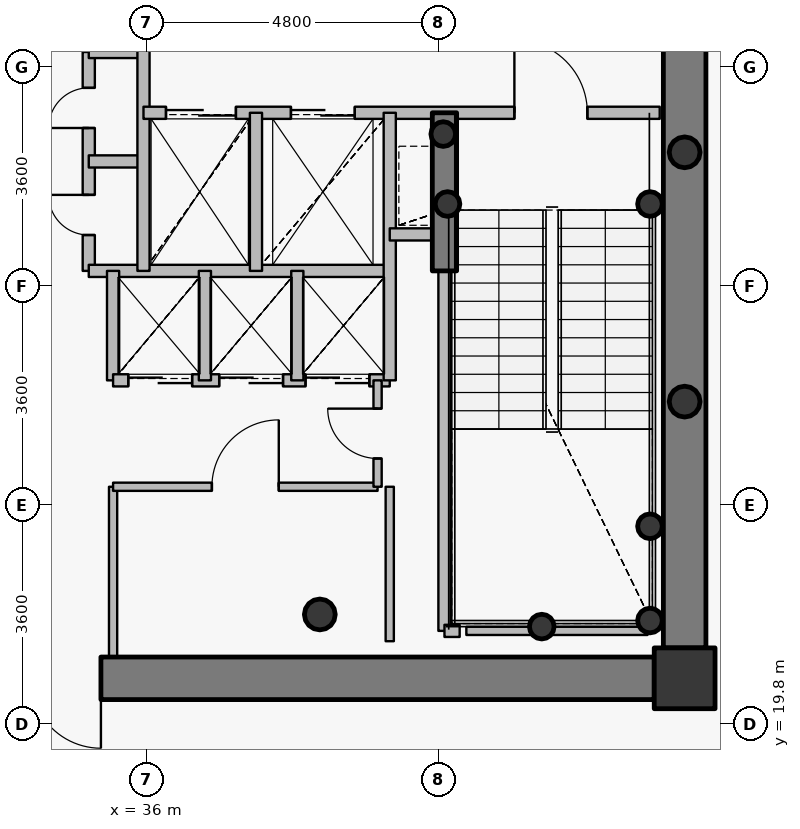
"""IFC4 building model, lengths in metres.
Left out: names, types, materials, properties, quantities, classifications, styles, units other than length and angle.
Written with IfcOpenShell. Run it as: python <this file> out.ifc"""

import sys

from ifc_helpers import new_model, si_unit, direction, frame, frame_2d, origin, origin_2d, place, context, subcontext, project, spatial, rectangle, hollow_circle, extrude, source, transform, mapped, element, fill, save


model = new_model("IFC4")
c1 = context("Model", 3, precision=1e-05, world=origin(), true_north=direction((0.0, 1.0)))
c2 = subcontext(c1, "Body", "Model", "MODEL_VIEW")
j1 = project(units=[si_unit("LENGTHUNIT", "METRE"), si_unit("PLANEANGLEUNIT", "RADIAN")], contexts=[c1])
p1 = place(None, origin())
s1 = spatial("IfcSite", under=j1, at=p1, CompositionType="ELEMENT")
p2 = place(p1, origin())
s2 = spatial("IfcBuilding", under=s1, at=p2, CompositionType="ELEMENT")
p3 = place(p2, frame((0.0, 0.0, 276.75)))
s3 = spatial("IfcBuildingStorey", under=s2, at=p3, CompositionType="ELEMENT", Elevation=276.75)
p4 = place(p3, frame((44.85, 20.55, 0.0), z_axis=(0.0, 0.0, 1.0), x_axis=(1.0, 0.0, 0.0)))
e1 = element("IfcColumn", 1, at=p4, inside=s3, PredefinedType="COLUMN", context=c2, shape_type="SweptSolid", body=[
    extrude(rectangle(XDim=1.0, YDim=1.0, at=origin_2d()), origin(), (0.0, 0.0, 1.0), 3.75),
])
p5 = place(p3, frame((38.85, 21.6, 0.0), z_axis=(0.0, 0.0, 1.0), x_axis=(1.0, 0.0, 0.0)))
e2 = element("IfcColumn", 2, at=p5, inside=s3, PredefinedType="COLUMN", context=c2, shape_type="SweptSolid", body=[
    extrude(hollow_circle(Radius=0.254, WallThickness=0.02, at=origin_2d()), origin(), (0.0, 0.0, 1.0), 3.75),
])
for number, where, z_axis, x_axis in (
    (3, (44.28, 21.5, 0.0), (0.0, 0.0, 1.0), (1.0, 0.0, 0.0)),
    (4, (44.28, 23.05, 0.0), (0.0, 0.0, 1.0), (1.0, 0.0, 0.0)),
    (5, (42.5, 21.4, 0.0), (0.0, 0.0, 1.0), (1.0, 0.0, 0.0)),
    (6, (40.95, 28.35, 0.0), (0.0, 0.0, 1.0), (1.0, 0.0, 0.0)),
    (7, (44.28, 28.35, 0.0), (0.0, 0.0, 1.0), (1.0, 0.0, 0.0)),
    (8, (40.88, 29.5, 0.0), (0.0, 0.0, 1.0), (1.0, 0.0, 0.0)),
):
    element("IfcColumn", number, at=place(p3, frame(where, z_axis=z_axis, x_axis=x_axis)), inside=s3, PredefinedType="COLUMN", context=c2, shape_type="SweptSolid", body=[
        extrude(hollow_circle(Radius=0.203, WallThickness=0.016, at=origin_2d()), origin(), (0.0, 0.0, 1.0), 3.75),
    ])
p6 = place(p3, frame((44.85, 32.95, 0.0), z_axis=(0.0, 0.0, 1.0), x_axis=(0.0, -1.0, 0.0)))
e9 = element("IfcWall", 9, at=p6, inside=s3, PredefinedType="SHEAR", context=c2, shape_type="SweptSolid", body=[
    extrude(rectangle(XDim=11.9, YDim=0.7, at=frame_2d((5.95, 0.0))), origin(), (0.0, 0.0, 1.0), 3.05),
])
p7 = place(p3, frame((44.35, 20.55, 0.0), z_axis=(0.0, 0.0, 1.0), x_axis=(-1.0, 0.0, 0.0)))
e10 = element("IfcWall", 10, at=p7, inside=s3, PredefinedType="SHEAR", context=c2, shape_type="SweptSolid", body=[
    extrude(rectangle(XDim=16.7, YDim=0.7, at=frame_2d((8.35, 0.0))), origin(), (0.0, 0.0, 1.0), 3.05),
])
p8 = place(p7, frame((12.925, 0.0, 0.0)))
e11 = element("IfcOpeningElement", 11, at=p8, cuts=e10, PredefinedType="OPENING", context=c2, shape_type="SweptSolid", body=[
    extrude(rectangle(XDim=1.15, YDim=2.15, at=origin_2d()), frame((0.575, 0.36, 1.075), z_axis=(0.0, -1.0, 0.0), x_axis=(1.0, 0.0, 0.0)), (0.0, 0.0, 1.0), 0.72),
])
p9 = place(p7, frame((9.1, 0.0, 0.0)))
e12 = element("IfcOpeningElement", 12, at=p9, cuts=e10, PredefinedType="OPENING", context=c2, shape_type="SweptSolid", body=[
    extrude(rectangle(XDim=1.15, YDim=2.15, at=origin_2d()), frame((0.575, 0.36, 1.075), z_axis=(0.0, -1.0, 0.0), x_axis=(1.0, 0.0, 0.0)), (0.0, 0.0, 1.0), 0.72),
])
p10 = place(p3, frame((40.9, 27.25, 0.0), z_axis=(0.0, 0.0, 1.0), x_axis=(0.0, 1.0, 0.0)))
e13 = element("IfcWall", 13, at=p10, inside=s3, PredefinedType="SHEAR", context=c2, shape_type="SweptSolid", body=[
    extrude(rectangle(XDim=2.6, YDim=0.4, at=frame_2d((1.3, 0.0))), origin(), (0.0, 0.0, 1.0), 3.1),
])
for number, where, z_axis, x_axis in (
    (14, (44.85, 25.1, 0.0), (0.0, 0.0, 1.0), (1.0, 0.0, 0.0)),
    (15, (44.85, 29.2, 0.0), (0.0, 0.0, 1.0), (1.0, 0.0, 0.0)),
):
    element("IfcColumn", number, at=place(p3, frame(where, z_axis=z_axis, x_axis=x_axis)), inside=s3, PredefinedType="COLUMN", context=c2, shape_type="SweptSolid", body=[
        extrude(hollow_circle(Radius=0.254, WallThickness=0.02, at=origin_2d()), origin(), (0.0, 0.0, 1.0), 3.75),
    ])
p11 = place(p3, frame((35.05, 27.25, 0.0), z_axis=(0.0, 0.0, 1.0), x_axis=(0.0, 1.0, 0.0)))
e16 = element("IfcWall", 16, at=p11, inside=s3, PredefinedType="PARTITIONING", context=c2, shape_type="SweptSolid", body=[
    extrude(rectangle(XDim=3.6, YDim=0.2, at=frame_2d((1.8, 0.0))), origin(), (0.0, 0.0, 1.0), 3.5),
])
p12 = place(p11, frame((0.59, 0.0, 0.0)))
e17 = element("IfcOpeningElement", 17, at=p12, cuts=e16, PredefinedType="OPENING", context=c2, shape_type="SweptSolid", body=[
    extrude(rectangle(XDim=0.66, YDim=2.05, at=origin_2d()), frame((0.33, 0.11, 1.025), z_axis=(0.0, -1.0, 0.0), x_axis=(1.0, 0.0, 0.0)), (0.0, 0.0, 1.0), 0.22),
])
p13 = place(p11, frame((2.35, 0.0, 0.0)))
e18 = element("IfcOpeningElement", 18, at=p13, cuts=e16, PredefinedType="OPENING", context=c2, shape_type="SweptSolid", body=[
    extrude(rectangle(XDim=0.66, YDim=2.05, at=origin_2d()), frame((0.33, 0.11, 1.025), z_axis=(0.0, -1.0, 0.0), x_axis=(1.0, 0.0, 0.0)), (0.0, 0.0, 1.0), 0.22),
])
p14 = place(p3, frame((35.05, 27.25, 0.0), z_axis=(0.0, 0.0, 1.0), x_axis=(1.0, 0.0, 0.0)))
e19 = element("IfcWall", 19, at=p14, inside=s3, PredefinedType="PARTITIONING", context=c2, shape_type="SweptSolid", body=[
    extrude(rectangle(XDim=4.95, YDim=0.2, at=frame_2d((2.475, 0.0))), origin(), (0.0, 0.0, 1.0), 3.085),
])
for number, where, z_axis, x_axis in (
    (20, (35.05, 29.05, 0.0), (0.0, 0.0, 1.0), (1.0, 0.0, 0.0)),
    (21, (35.05, 30.85, 0.0), (0.0, 0.0, 1.0), (1.0, 0.0, 0.0)),
):
    element("IfcWall", number, at=place(p3, frame(where, z_axis=z_axis, x_axis=x_axis)), inside=s3, PredefinedType="PARTITIONING", context=c2, shape_type="SweptSolid", body=[
        extrude(rectangle(XDim=0.9, YDim=0.2, at=frame_2d((0.45, 0.0))), origin(), (0.0, 0.0, 1.0), 3.5),
    ])
p15 = place(p3, frame((35.45, 20.9, 0.0), z_axis=(0.0, 0.0, 1.0), x_axis=(0.0, 1.0, 0.0)))
e22 = element("IfcWall", 22, at=p15, inside=s3, PredefinedType="PARTITIONING", context=c2, shape_type="SweptSolid", body=[
    extrude(rectangle(XDim=2.8, YDim=0.135, at=frame_2d((1.4, 0.0))), origin(), (0.0, 0.0, 1.0), 3.085),
])
p16 = place(p3, frame((35.45, 23.7, 0.0), z_axis=(0.0, 0.0, 1.0), x_axis=(1.0, 0.0, 0.0)))
e23 = element("IfcWall", 23, at=p16, inside=s3, PredefinedType="PARTITIONING", context=c2, shape_type="SweptSolid", body=[
    extrude(rectangle(XDim=4.35, YDim=0.135, at=frame_2d((2.175, 0.0))), origin(), (0.0, 0.0, 1.0), 3.085),
])
p17 = place(p16, frame((1.625, 0.0, 0.0)))
e24 = element("IfcOpeningElement", 24, at=p17, cuts=e23, PredefinedType="OPENING", context=c2, shape_type="SweptSolid", body=[
    extrude(rectangle(XDim=1.1, YDim=2.15, at=origin_2d()), frame((0.55, 0.078, 1.075), z_axis=(0.0, -1.0, 0.0), x_axis=(1.0, 0.0, 0.0)), (0.0, 0.0, 1.0), 0.155),
])
p18 = place(p3, frame((35.45, 25.45, 0.0), z_axis=(0.0, 0.0, 1.0), x_axis=(0.0, 1.0, 0.0)))
e25 = element("IfcWall", 25, at=p18, inside=s3, PredefinedType="PARTITIONING", context=c2, shape_type="SweptSolid", body=[
    extrude(rectangle(XDim=1.8, YDim=0.2, at=frame_2d((0.9, 0.0))), origin(), (0.0, 0.0, 1.0), 3.5),
])
p19 = place(p3, frame((35.45, 25.45, 0.0), z_axis=(0.0, 0.0, 1.0), x_axis=(1.0, 0.0, 0.0)))
e26 = element("IfcWall", 26, at=p19, inside=s3, PredefinedType="PARTITIONING", context=c2, shape_type="SweptSolid", body=[
    extrude(rectangle(XDim=4.55, YDim=0.2, at=frame_2d((2.275, 0.0))), origin(), (0.0, 0.0, 1.0), 3.085),
])
p20 = place(p19, frame((0.25, 0.0, 0.0)))
e27 = element("IfcOpeningElement", 27, at=p20, cuts=e26, PredefinedType="OPENING", context=c2, shape_type="SweptSolid", body=[
    extrude(rectangle(XDim=1.05, YDim=2.15, at=origin_2d()), frame((0.525, 0.11, 1.075), z_axis=(0.0, -1.0, 0.0), x_axis=(1.0, 0.0, 0.0)), (0.0, 0.0, 1.0), 0.22),
])
p21 = place(p19, frame((1.745, 0.0, 0.0)))
e28 = element("IfcOpeningElement", 28, at=p21, cuts=e26, PredefinedType="OPENING", context=c2, shape_type="SweptSolid", body=[
    extrude(rectangle(XDim=1.05, YDim=2.15, at=origin_2d()), frame((0.525, 0.11, 1.075), z_axis=(0.0, -1.0, 0.0), x_axis=(1.0, 0.0, 0.0)), (0.0, 0.0, 1.0), 0.22),
])
p22 = place(p19, frame((3.165, 0.0, 0.0)))
e29 = element("IfcOpeningElement", 29, at=p22, cuts=e26, PredefinedType="OPENING", context=c2, shape_type="SweptSolid", body=[
    extrude(rectangle(XDim=1.05, YDim=2.15, at=origin_2d()), frame((0.525, 0.11, 1.075), z_axis=(0.0, -1.0, 0.0), x_axis=(1.0, 0.0, 0.0)), (0.0, 0.0, 1.0), 0.22),
])
p23 = place(p3, frame((35.95, 27.25, 0.0), z_axis=(0.0, 0.0, 1.0), x_axis=(0.0, 1.0, 0.0)))
e30 = element("IfcWall", 30, at=p23, inside=s3, PredefinedType="PARTITIONING", context=c2, shape_type="SweptSolid", body=[
    extrude(rectangle(XDim=3.8, YDim=0.2, at=frame_2d((1.9, 0.0))), origin(), (0.0, 0.0, 1.0), 3.5),
])
p24 = place(p3, frame((35.95, 29.85, 0.0), z_axis=(0.0, 0.0, 1.0), x_axis=(1.0, 0.0, 0.0)))
e31 = element("IfcWall", 31, at=p24, inside=s3, PredefinedType="PARTITIONING", context=c2, shape_type="SweptSolid", body=[
    extrude(rectangle(XDim=8.49, YDim=0.2, at=frame_2d((4.245, 0.0))), origin(), (0.0, 0.0, 1.0), 3.085),
])
p25 = place(p24, frame((6.1, 0.0, 0.0)))
e32 = element("IfcOpeningElement", 32, at=p25, cuts=e31, PredefinedType="OPENING", context=c2, shape_type="SweptSolid", body=[
    extrude(rectangle(XDim=1.2, YDim=2.15, at=origin_2d()), frame((0.6, 0.11, 1.075), z_axis=(0.0, -1.0, 0.0), x_axis=(1.0, 0.0, 0.0)), (0.0, 0.0, 1.0), 0.22),
])
p26 = place(p24, frame((0.37, 0.0, 0.0)))
e33 = element("IfcOpeningElement", 33, at=p26, cuts=e31, PredefinedType="OPENING", context=c2, shape_type="SweptSolid", body=[
    extrude(rectangle(XDim=1.15, YDim=2.15, at=origin_2d()), frame((0.575, 0.11, 1.075), z_axis=(0.0, -1.0, 0.0), x_axis=(1.0, 0.0, 0.0)), (0.0, 0.0, 1.0), 0.22),
])
p27 = place(p24, frame((2.425, 0.0, 0.0)))
e34 = element("IfcOpeningElement", 34, at=p27, cuts=e31, PredefinedType="OPENING", context=c2, shape_type="SweptSolid", body=[
    extrude(rectangle(XDim=1.05, YDim=2.15, at=origin_2d()), frame((0.525, 0.11, 1.075), z_axis=(0.0, -1.0, 0.0), x_axis=(1.0, 0.0, 0.0)), (0.0, 0.0, 1.0), 0.22),
])
p28 = place(p3, frame((36.96, 25.45, 0.0), z_axis=(0.0, 0.0, 1.0), x_axis=(0.0, 1.0, 0.0)))
e35 = element("IfcWall", 35, at=p28, inside=s3, PredefinedType="PARTITIONING", context=c2, shape_type="SweptSolid", body=[
    extrude(rectangle(XDim=1.8, YDim=0.2, at=frame_2d((0.9, 0.0))), origin(), (0.0, 0.0, 1.0), 3.5),
])
p29 = place(p3, frame((37.8, 27.25, 0.0), z_axis=(0.0, 0.0, 1.0), x_axis=(0.0, 1.0, 0.0)))
e36 = element("IfcWall", 36, at=p29, inside=s3, PredefinedType="PARTITIONING", context=c2, shape_type="SweptSolid", body=[
    extrude(rectangle(XDim=2.6, YDim=0.2, at=frame_2d((1.3, 0.0))), origin(), (0.0, 0.0, 1.0), 3.5),
])
p30 = place(p3, frame((38.48, 25.45, 0.0), z_axis=(0.0, 0.0, 1.0), x_axis=(0.0, 1.0, 0.0)))
e37 = element("IfcWall", 37, at=p30, inside=s3, PredefinedType="PARTITIONING", context=c2, shape_type="SweptSolid", body=[
    extrude(rectangle(XDim=1.8, YDim=0.2, at=frame_2d((0.9, 0.0))), origin(), (0.0, 0.0, 1.0), 3.5),
])
p31 = place(p3, frame((39.8, 23.7, 0.0), z_axis=(0.0, 0.0, 1.0), x_axis=(0.0, 1.0, 0.0)))
e38 = element("IfcWall", 38, at=p31, inside=s3, PredefinedType="PARTITIONING", context=c2, shape_type="SweptSolid", body=[
    extrude(rectangle(XDim=1.75, YDim=0.135, at=frame_2d((0.875, 0.0))), origin(), (0.0, 0.0, 1.0), 3.5),
])
p32 = place(p31, frame((0.465, 0.0, 0.0)))
e39 = element("IfcOpeningElement", 39, at=p32, cuts=e38, PredefinedType="OPENING", context=c2, shape_type="SweptSolid", body=[
    extrude(rectangle(XDim=0.82, YDim=2.1, at=origin_2d()), frame((0.41, 0.078, 1.05), z_axis=(0.0, -1.0, 0.0), x_axis=(1.0, 0.0, 0.0)), (0.0, 0.0, 1.0), 0.155),
])
p33 = place(p3, frame((40.0, 25.45, 0.0), z_axis=(0.0, 0.0, 1.0), x_axis=(0.0, 1.0, 0.0)))
e40 = element("IfcWall", 40, at=p33, inside=s3, PredefinedType="PARTITIONING", context=c2, shape_type="SweptSolid", body=[
    extrude(rectangle(XDim=4.4, YDim=0.2, at=frame_2d((2.2, 0.0))), origin(), (0.0, 0.0, 1.0), 3.5),
])
p34 = place(p3, frame((40.0, 27.85, 0.0), z_axis=(0.0, 0.0, 1.0), x_axis=(1.0, 0.0, 0.0)))
e41 = element("IfcWall", 41, at=p34, inside=s3, PredefinedType="PARTITIONING", context=c2, shape_type="SweptSolid", body=[
    extrude(rectangle(XDim=0.9, YDim=0.2, at=frame_2d((0.45, 0.0))), origin(), (0.0, 0.0, 1.0), 3.5),
])
p35 = place(p3, frame((40.9, 21.33, 0.0), z_axis=(0.0, 0.0, 1.0), x_axis=(0.0, 1.0, 0.0)))
e42 = element("IfcWall", 42, at=p35, inside=s3, PredefinedType="PARTITIONING", context=c2, shape_type="SweptSolid", body=[
    extrude(rectangle(XDim=5.91, YDim=0.2, at=frame_2d((2.955, 0.0))), origin(), (0.0, 0.0, 1.0), 3.035),
])
p36 = place(p3, frame((40.9, 21.33, 0.0), z_axis=(0.0, 0.0, 1.0), x_axis=(1.0, 0.0, 0.0)))
e43 = element("IfcWall", 43, at=p36, inside=s3, PredefinedType="PARTITIONING", context=c2, shape_type="SweptSolid", body=[
    extrude(rectangle(XDim=0.25, YDim=0.2, at=frame_2d((0.125, 0.0))), origin(), (0.0, 0.0, 1.0), 3.035),
])
p37 = place(p3, frame((44.24, 21.33, 0.0), z_axis=(0.0, 0.0, 1.0), x_axis=(-1.0, 0.0, 0.0)))
e44 = element("IfcWall", 44, at=p37, inside=s3, PredefinedType="PARTITIONING", context=c2, shape_type="SweptSolid", body=[
    extrude(rectangle(XDim=2.98, YDim=0.135, at=frame_2d((1.49, 0.0))), origin(), (0.0, 0.0, 1.0), 3.035),
])
p38 = place(p3, frame((40.0, 23.7, 0.0), z_axis=(0.0, 0.0, 1.0), x_axis=(0.0, -1.0, 0.0)))
e45 = element("IfcWall", 45, at=p38, inside=s3, PredefinedType="PARTITIONING", context=c2, shape_type="SweptSolid", body=[
    extrude(rectangle(XDim=2.54, YDim=0.135, at=frame_2d((1.27, 0.0))), origin(), (0.0, 0.0, 1.0), 3.035),
])
p39 = place(p3, frame((44.36, 20.2, 0.0), z_axis=(0.0, 0.0, 1.0), x_axis=(1.0, 0.0, 0.0)))
e46 = element("IfcWall", 46, at=p39, inside=s3, PredefinedType="PARTITIONING", context=c2, shape_type="SweptSolid", body=[
    extrude(rectangle(XDim=0.84, YDim=0.135, at=frame_2d((0.42, 0.0))), origin(), (0.0, 0.0, 1.0), 3.035),
])
p40 = place(p3, frame((45.2, 20.508, 0.0), z_axis=(0.0, 0.0, 1.0), x_axis=(0.0, 1.0, 0.0)))
e47 = element("IfcWall", 47, at=p40, inside=s3, PredefinedType="PARTITIONING", context=c2, shape_type="SweptSolid", body=[
    extrude(rectangle(XDim=0.532, YDim=0.135, at=frame_2d((0.266, 0.0))), origin(), (0.0, 0.0, 1.0), 3.5),
])
m1 = source(origin(), c2, "Body", "SweptSolid", [
    extrude(rectangle(XDim=1.15, YDim=2.15, at=origin_2d()), frame((0.575, 0.025, 1.075), z_axis=(0.0, -1.0, 0.0), x_axis=(1.0, 0.0, 0.0)), (0.0, 0.0, 1.0), 0.05),
])
p41 = place(p9, origin())
e48 = element("IfcDoor", 48, at=p41, inside=s3, OperationType="SINGLE_SWING_LEFT", PredefinedType="DOOR", context=c2, shape_type="MappedRepresentation", body=[
    mapped(m1, transform((0.0, 0.0, 0.0), x_axis=(1.0, 0.0, 0.0), y_axis=(0.0, 1.0, 0.0), z_axis=(0.0, 0.0, 1.0), scale=1.0)),
])
fill(e12, e48)
m2 = source(origin(), c2, "Body", "SweptSolid", [
    extrude(rectangle(XDim=1.2, YDim=2.15, at=origin_2d()), frame((0.6, 0.025, 1.075), z_axis=(0.0, -1.0, 0.0), x_axis=(1.0, 0.0, 0.0)), (0.0, 0.0, 1.0), 0.05),
])
p42 = place(p25, origin())
e49 = element("IfcDoor", 49, at=p42, inside=s3, OperationType="SINGLE_SWING_LEFT", PredefinedType="DOOR", context=c2, shape_type="MappedRepresentation", body=[
    mapped(m2, transform((0.0, 0.0, 0.0), x_axis=(1.0, 0.0, 0.0), y_axis=(0.0, 1.0, 0.0), z_axis=(0.0, 0.0, 1.0), scale=1.0)),
])
fill(e32, e49)
m3 = source(origin(), c2, "Body", "SweptSolid", [
    extrude(rectangle(XDim=1.15, YDim=2.15, at=origin_2d()), frame((0.575, 0.025, 1.075), z_axis=(0.0, -1.0, 0.0), x_axis=(1.0, 0.0, 0.0)), (0.0, 0.0, 1.0), 0.05),
])
p43 = place(p26, origin())
e50 = element("IfcDoor", 50, at=p43, inside=s3, OperationType="DOUBLE_DOOR_SLIDING", PredefinedType="USERDEFINED", context=c2, shape_type="MappedRepresentation", body=[
    mapped(m3, transform((0.0, 0.0, 0.0), x_axis=(1.0, 0.0, 0.0), y_axis=(0.0, 1.0, 0.0), z_axis=(0.0, 0.0, 1.0), scale=1.0)),
])
fill(e33, e50)
m4 = source(origin(), c2, "Body", "SweptSolid", [
    extrude(rectangle(XDim=1.05, YDim=2.15, at=origin_2d()), frame((0.525, 0.025, 1.075), z_axis=(0.0, -1.0, 0.0), x_axis=(1.0, 0.0, 0.0)), (0.0, 0.0, 1.0), 0.05),
])
p44 = place(p27, origin())
e51 = element("IfcDoor", 51, at=p44, inside=s3, OperationType="DOUBLE_DOOR_SLIDING", PredefinedType="USERDEFINED", context=c2, shape_type="MappedRepresentation", body=[
    mapped(m4, transform((0.0, 0.0, 0.0), x_axis=(1.0, 0.0, 0.0), y_axis=(0.0, 1.0, 0.0), z_axis=(0.0, 0.0, 1.0), scale=1.0)),
])
fill(e34, e51)
p45 = place(p20, origin())
e52 = element("IfcDoor", 52, at=p45, inside=s3, OperationType="DOUBLE_DOOR_SLIDING", PredefinedType="USERDEFINED", context=c2, shape_type="MappedRepresentation", body=[
    mapped(m4, transform((0.0, 0.0, 0.0), x_axis=(1.0, 0.0, 0.0), y_axis=(0.0, 1.0, 0.0), z_axis=(0.0, 0.0, 1.0), scale=1.0)),
])
fill(e27, e52)
p46 = place(p21, origin())
e53 = element("IfcDoor", 53, at=p46, inside=s3, OperationType="DOUBLE_DOOR_SLIDING", PredefinedType="USERDEFINED", context=c2, shape_type="MappedRepresentation", body=[
    mapped(m4, transform((0.0, 0.0, 0.0), x_axis=(1.0, 0.0, 0.0), y_axis=(0.0, 1.0, 0.0), z_axis=(0.0, 0.0, 1.0), scale=1.0)),
])
fill(e28, e53)
p47 = place(p22, origin())
e54 = element("IfcDoor", 54, at=p47, inside=s3, OperationType="DOUBLE_DOOR_SLIDING", PredefinedType="USERDEFINED", context=c2, shape_type="MappedRepresentation", body=[
    mapped(m4, transform((0.0, 0.0, 0.0), x_axis=(1.0, 0.0, 0.0), y_axis=(0.0, 1.0, 0.0), z_axis=(0.0, 0.0, 1.0), scale=1.0)),
])
fill(e29, e54)
m5 = source(origin(), c2, "Body", "SweptSolid", [
    extrude(rectangle(XDim=0.66, YDim=2.05, at=origin_2d()), frame((0.33, 0.025, 1.025), z_axis=(0.0, -1.0, 0.0), x_axis=(1.0, 0.0, 0.0)), (0.0, 0.0, 1.0), 0.05),
])
p48 = place(p12, origin())
e55 = element("IfcDoor", 55, at=p48, inside=s3, OperationType="SINGLE_SWING_RIGHT", PredefinedType="USERDEFINED", context=c2, shape_type="MappedRepresentation", body=[
    mapped(m5, transform((0.0, 0.0, 0.0), x_axis=(1.0, 0.0, 0.0), y_axis=(0.0, 1.0, 0.0), z_axis=(0.0, 0.0, 1.0), scale=1.0)),
])
fill(e17, e55)
p49 = place(p13, origin())
e56 = element("IfcDoor", 56, at=p49, inside=s3, OperationType="SINGLE_SWING_LEFT", PredefinedType="USERDEFINED", context=c2, shape_type="MappedRepresentation", body=[
    mapped(m5, transform((0.0, 0.0, 0.0), x_axis=(1.0, 0.0, 0.0), y_axis=(0.0, 1.0, 0.0), z_axis=(0.0, 0.0, 1.0), scale=1.0)),
])
fill(e18, e56)
m6 = source(origin(), c2, "Body", "SweptSolid", [
    extrude(rectangle(XDim=1.1, YDim=2.15, at=origin_2d()), frame((0.55, 0.025, 1.075), z_axis=(0.0, -1.0, 0.0), x_axis=(1.0, 0.0, 0.0)), (0.0, 0.0, 1.0), 0.05),
])
p50 = place(p17, origin())
e57 = element("IfcDoor", 57, at=p50, inside=s3, OperationType="SINGLE_SWING_RIGHT", PredefinedType="DOOR", context=c2, shape_type="MappedRepresentation", body=[
    mapped(m6, transform((0.0, 0.0, 0.0), x_axis=(1.0, 0.0, 0.0), y_axis=(0.0, 1.0, 0.0), z_axis=(0.0, 0.0, 1.0), scale=1.0)),
])
fill(e24, e57)
m7 = source(origin(), c2, "Body", "SweptSolid", [
    extrude(rectangle(XDim=0.82, YDim=2.1, at=origin_2d()), frame((0.41, 0.025, 1.05), z_axis=(0.0, -1.0, 0.0), x_axis=(1.0, 0.0, 0.0)), (0.0, 0.0, 1.0), 0.05),
])
p51 = place(p32, origin())
e58 = element("IfcDoor", 58, at=p51, inside=s3, OperationType="SINGLE_SWING_RIGHT", PredefinedType="DOOR", context=c2, shape_type="MappedRepresentation", body=[
    mapped(m7, transform((0.0, 0.0, 0.0), x_axis=(1.0, 0.0, 0.0), y_axis=(0.0, 1.0, 0.0), z_axis=(0.0, 0.0, 1.0), scale=1.0)),
])
fill(e39, e58)
save(model, sys.argv[1])
